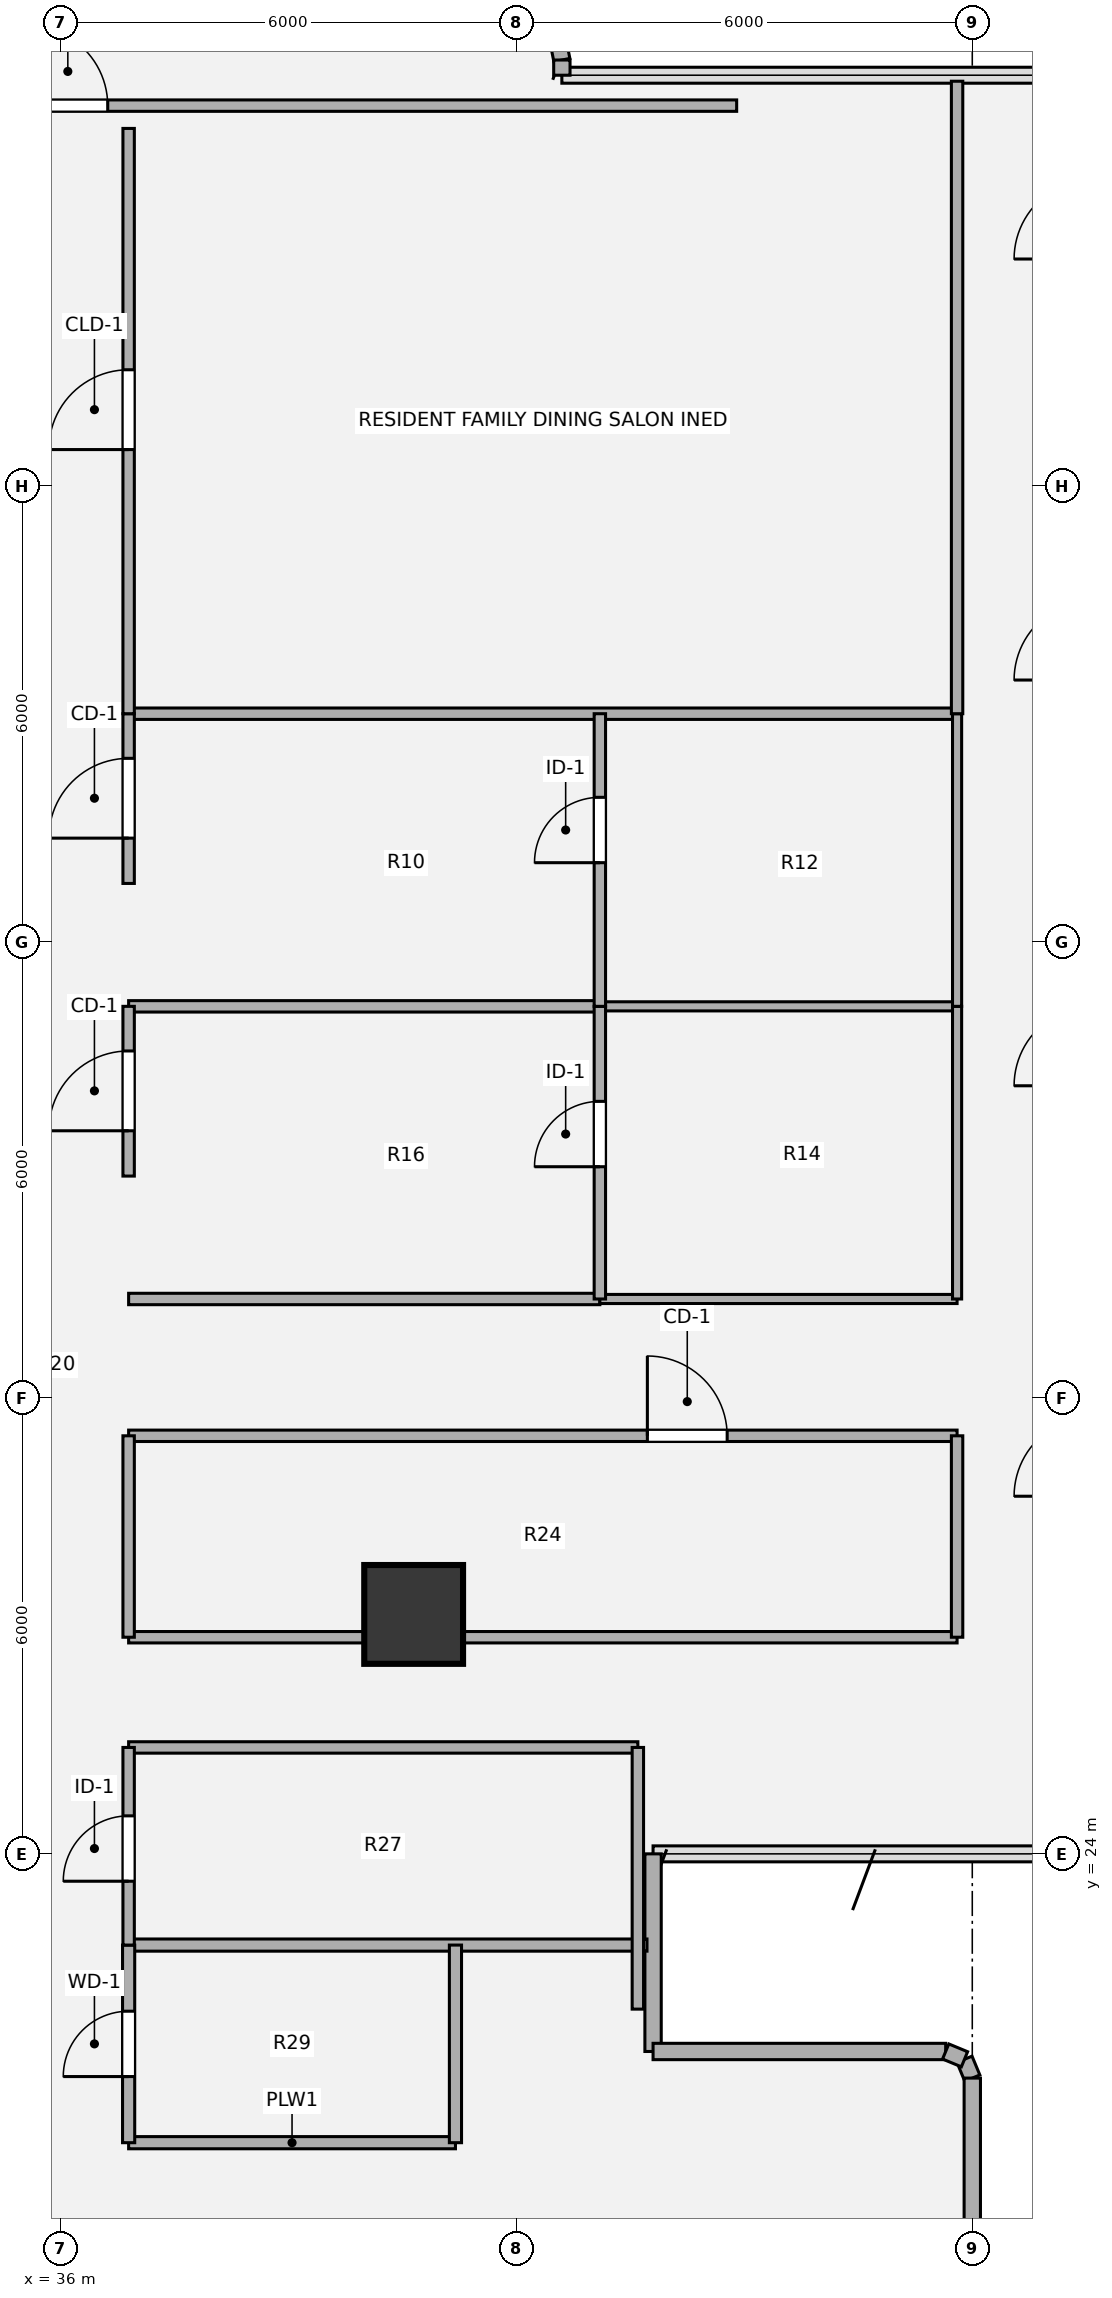
"""IFC4 building model, lengths in metres.
Left out: names, types, materials, properties, quantities, classifications, styles, units other than length and angle.
Written with IfcOpenShell. Run it as: python <this file> out.ifc"""

import sys

from ifc_helpers import new_model, si_unit, direction, frame, frame_2d, origin, origin_2d, place, context, subcontext, project, spatial, rectangle, hollow_circle, extrude, source, transform, mapped, element, fill, save


model = new_model("IFC4")
c1 = context("Model", 3, precision=1e-05, world=origin(), true_north=direction((0.0, 1.0)))
c2 = subcontext(c1, "Body", "Model", "MODEL_VIEW")
j1 = project(units=[si_unit("LENGTHUNIT", "METRE"), si_unit("PLANEANGLEUNIT", "RADIAN")], contexts=[c1])
p1 = place(None, origin())
s1 = spatial("IfcSite", under=j1, at=p1, CompositionType="ELEMENT")
p2 = place(p1, origin())
s2 = spatial("IfcBuilding", under=s1, at=p2, CompositionType="ELEMENT")
p3 = place(p2, frame((0.0, 0.0, 135.18)))
s3 = spatial("IfcBuildingStorey", under=s2, at=p3, CompositionType="ELEMENT", Elevation=135.18)
m1 = source(origin(), c2, "Body", "SweptSolid", [
    extrude(hollow_circle(Radius=0.65, WallThickness=0.045, at=origin_2d()), origin(), (0.0, 0.0, 1.0), 3.78),
])
p4 = place(p3, frame((40.65, 27.15, 0.0), z_axis=(0.0, 0.0, 1.0), x_axis=(1.0, 0.0, 0.0)))
e1 = element("IfcColumn", 1, at=p4, inside=s3, PredefinedType="COLUMN", context=c2, shape_type="MappedRepresentation", body=[
    mapped(m1, transform((0.0, 0.0, 0.0), x_axis=(1.0, 0.0, 0.0), y_axis=(0.0, 1.0, 0.0), z_axis=(0.0, 0.0, 1.0), scale=1.0)),
])
p5 = place(p3, frame((47.897, 21.298, 0.0), z_axis=(0.0, 0.0, 1.0), x_axis=(0.382673670509, -0.923883575944, 0.0)))
e2 = element("IfcWall", 2, at=p5, inside=s3, PredefinedType="SOLIDWALL", context=c2, shape_type="SweptSolid", body=[
    extrude(rectangle(XDim=0.268, YDim=0.215, at=frame_2d((0.134, 0.0))), origin(), (0.0, 0.0, 1.0), 3.53),
])
p6 = place(p3, frame((48.0, 21.05, 0.0), z_axis=(0.0, 0.0, 1.0), x_axis=(0.0, -1.0, 0.0)))
e3 = element("IfcWall", 3, at=p6, inside=s3, PredefinedType="SOLIDWALL", context=c2, shape_type="SweptSolid", body=[
    extrude(rectangle(XDim=2.62, YDim=0.215, at=frame_2d((1.31, 0.0))), origin(), (0.0, 0.0, 1.0), 3.53),
])
p7 = place(p3, frame((42.387, 48.671, 0.0), z_axis=(0.0, 0.0, 1.0), x_axis=(0.195127417394, -0.980777900945, 0.0)))
e4 = element("IfcWall", 4, at=p7, inside=s3, PredefinedType="SOLIDWALL", context=c2, shape_type="SweptSolid", body=[
    extrude(rectangle(XDim=1.092, YDim=0.215, at=frame_2d((0.546, 0.0))), origin(), (0.0, 0.0, 1.0), 3.53),
])
p8 = place(p3, frame((42.6, 47.6, 0.0), z_axis=(0.0, 0.0, 1.0), x_axis=(0.0, -1.0, 0.0)))
e5 = element("IfcWall", 5, at=p8, inside=s3, PredefinedType="SOLIDWALL", context=c2, shape_type="SweptSolid", body=[
    extrude(rectangle(XDim=0.2, YDim=0.215, at=frame_2d((0.1, 0.0))), origin(), (0.0, 0.0, 1.0), 3.53),
])
p9 = place(p3, frame((43.8, 24.0, 0.0), z_axis=(0.0, 0.0, 1.0), x_axis=(0.0, -1.0, 0.0)))
e6 = element("IfcWall", 6, at=p9, inside=s3, PredefinedType="SOLIDWALL", context=c2, shape_type="SweptSolid", body=[
    extrude(rectangle(XDim=2.6, YDim=0.215, at=frame_2d((1.3, 0.0))), origin(), (0.0, 0.0, 1.0), 3.53),
])
p10 = place(p3, frame((43.8, 21.4, 0.0), z_axis=(0.0, 0.0, 1.0), x_axis=(1.0, 0.0, 0.0)))
e7 = element("IfcWall", 7, at=p10, inside=s3, PredefinedType="SOLIDWALL", context=c2, shape_type="SweptSolid", body=[
    extrude(rectangle(XDim=3.85, YDim=0.215, at=frame_2d((1.925, 0.0))), origin(), (0.0, 0.0, 1.0), 3.53),
])
p11 = place(p3, frame((47.65, 21.4, 0.0), z_axis=(0.0, 0.0, 1.0), x_axis=(0.924205486139, -0.381895560841, 0.0)))
e8 = element("IfcWall", 8, at=p11, inside=s3, PredefinedType="SOLIDWALL", context=c2, shape_type="SweptSolid", body=[
    extrude(rectangle(XDim=0.268, YDim=0.215, at=frame_2d((0.134, 0.0))), origin(), (0.0, 0.0, 1.0), 3.53),
])
p12 = place(p3, frame((36.9, 20.2, 0.0), z_axis=(0.0, 0.0, 1.0), x_axis=(1.0, 0.0, 0.0)))
e9 = element("IfcWall", 9, at=p12, inside=s3, PredefinedType="PLUMBINGWALL", context=c2, shape_type="SweptSolid", body=[
    extrude(rectangle(XDim=4.3, YDim=0.16, at=frame_2d((2.15, 0.0))), origin(), (0.0, 0.0, 1.0), 3.5),
])
p13 = place(p3, frame((36.9, 22.8, 0.0), z_axis=(0.0, 0.0, 1.0), x_axis=(1.0, 0.0, 0.0)))
e10 = element("IfcWall", 10, at=p13, inside=s3, PredefinedType="PLUMBINGWALL", context=c2, shape_type="SweptSolid", body=[
    extrude(rectangle(XDim=6.82, YDim=0.16, at=frame_2d((3.41, 0.0))), origin(), (0.0, 0.0, 1.0), 3.5),
])
p14 = place(p3, frame((36.9, 25.4, 0.0), z_axis=(0.0, 0.0, 1.0), x_axis=(1.0, 0.0, 0.0)))
e11 = element("IfcWall", 11, at=p14, inside=s3, PredefinedType="PARTITIONING", context=c2, shape_type="SweptSolid", body=[
    extrude(rectangle(XDim=6.7, YDim=0.15, at=frame_2d((3.35, 0.0))), origin(), (0.0, 0.0, 1.0), 3.5),
])
p15 = place(p3, frame((36.9, 26.85, 0.0), z_axis=(0.0, 0.0, 1.0), x_axis=(1.0, 0.0, 0.0)))
e12 = element("IfcWall", 12, at=p15, inside=s3, PredefinedType="PARTITIONING", context=c2, shape_type="SweptSolid", body=[
    extrude(rectangle(XDim=10.9, YDim=0.15, at=frame_2d((5.45, 0.0))), origin(), (0.0, 0.0, 1.0), 2.903),
])
p16 = place(p3, frame((36.9, 29.5, 0.0), z_axis=(0.0, 0.0, 1.0), x_axis=(1.0, 0.0, 0.0)))
e13 = element("IfcWall", 13, at=p16, inside=s3, PredefinedType="PARTITIONING", context=c2, shape_type="SweptSolid", body=[
    extrude(rectangle(XDim=10.9, YDim=0.15, at=frame_2d((5.45, 0.0))), origin(), (0.0, 0.0, 1.0), 2.982),
])
p17 = place(p16, frame((6.825, 0.0, 0.0)))
e14 = element("IfcOpeningElement", 14, at=p17, cuts=e13, PredefinedType="OPENING", context=c2, shape_type="SweptSolid", body=[
    extrude(rectangle(XDim=1.05, YDim=2.1, at=origin_2d()), frame((0.525, 0.085, 1.05), z_axis=(0.0, -1.0, 0.0), x_axis=(1.0, 0.0, 0.0)), (0.0, 0.0, 1.0), 0.17),
])
p18 = place(p3, frame((36.9, 31.3, 0.0), z_axis=(0.0, 0.0, 1.0), x_axis=(1.0, 0.0, 0.0)))
e15 = element("IfcWall", 15, at=p18, inside=s3, PredefinedType="PARTITIONING", context=c2, shape_type="SweptSolid", body=[
    extrude(rectangle(XDim=6.2, YDim=0.15, at=frame_2d((3.1, 0.0))), origin(), (0.0, 0.0, 1.0), 2.982),
])
p19 = place(p3, frame((43.1, 31.3, 0.0), z_axis=(0.0, 0.0, 1.0), x_axis=(1.0, 0.0, 0.0)))
e16 = element("IfcWall", 16, at=p19, inside=s3, PredefinedType="PARTITIONING", context=c2, shape_type="SweptSolid", body=[
    extrude(rectangle(XDim=4.7, YDim=0.12, at=frame_2d((2.35, 0.0))), origin(), (0.0, 0.0, 1.0), 2.982),
])
p20 = place(p3, frame((36.9, 35.15, 0.0), z_axis=(0.0, 0.0, 1.0), x_axis=(1.0, 0.0, 0.0)))
e17 = element("IfcWall", 17, at=p20, inside=s3, PredefinedType="PARTITIONING", context=c2, shape_type="SweptSolid", body=[
    extrude(rectangle(XDim=6.2, YDim=0.15, at=frame_2d((3.1, 0.0))), origin(), (0.0, 0.0, 1.0), 2.982),
])
p21 = place(p3, frame((43.1, 35.15, 0.0), z_axis=(0.0, 0.0, 1.0), x_axis=(1.0, 0.0, 0.0)))
e18 = element("IfcWall", 18, at=p21, inside=s3, PredefinedType="PARTITIONING", context=c2, shape_type="SweptSolid", body=[
    extrude(rectangle(XDim=4.7, YDim=0.12, at=frame_2d((2.35, 0.0))), origin(), (0.0, 0.0, 1.0), 2.982),
])
p22 = place(p3, frame((36.9, 39.0, 0.0), z_axis=(0.0, 0.0, 1.0), x_axis=(1.0, 0.0, 0.0)))
e19 = element("IfcWall", 19, at=p22, inside=s3, PredefinedType="PARTITIONING", context=c2, shape_type="SweptSolid", body=[
    extrude(rectangle(XDim=10.9, YDim=0.15, at=frame_2d((5.45, 0.0))), origin(), (0.0, 0.0, 1.0), 2.903),
])
p23 = place(p3, frame((35.1, 47.0, 0.0), z_axis=(0.0, 0.0, 1.0), x_axis=(1.0, 0.0, 0.0)))
e20 = element("IfcWall", 20, at=p23, inside=s3, PredefinedType="PARTITIONING", context=c2, shape_type="SweptSolid", body=[
    extrude(rectangle(XDim=9.8, YDim=0.15, at=frame_2d((4.9, 0.0))), origin(), (0.0, 0.0, 1.0), 3.308),
])
p24 = place(p23, frame((0.475, 0.0, 0.0)))
e21 = element("IfcOpeningElement", 21, at=p24, cuts=e20, PredefinedType="OPENING", context=c2, shape_type="SweptSolid", body=[
    extrude(rectangle(XDim=1.05, YDim=2.1, at=origin_2d()), frame((0.525, 0.085, 1.05), z_axis=(0.0, -1.0, 0.0), x_axis=(1.0, 0.0, 0.0)), (0.0, 0.0, 1.0), 0.17),
])
p25 = place(p3, frame((36.9, 20.2, 0.0), z_axis=(0.0, 0.0, 1.0), x_axis=(0.0, 1.0, 0.0)))
e22 = element("IfcWall", 22, at=p25, inside=s3, PredefinedType="PLUMBINGWALL", context=c2, shape_type="SweptSolid", body=[
    extrude(rectangle(XDim=2.6, YDim=0.16, at=frame_2d((1.3, 0.0))), origin(), (0.0, 0.0, 1.0), 3.5),
])
p26 = place(p25, frame((0.87, 0.0, 0.0)))
e23 = element("IfcOpeningElement", 23, at=p26, cuts=e22, PredefinedType="OPENING", context=c2, shape_type="SweptSolid", body=[
    extrude(rectangle(XDim=0.86, YDim=2.1, at=origin_2d()), frame((0.43, 0.09, 1.05), z_axis=(0.0, -1.0, 0.0), x_axis=(1.0, 0.0, 0.0)), (0.0, 0.0, 1.0), 0.18),
])
p27 = place(p3, frame((36.9, 22.8, 0.0), z_axis=(0.0, 0.0, 1.0), x_axis=(0.0, 1.0, 0.0)))
e24 = element("IfcWall", 24, at=p27, inside=s3, PredefinedType="PARTITIONING", context=c2, shape_type="SweptSolid", body=[
    extrude(rectangle(XDim=2.6, YDim=0.15, at=frame_2d((1.3, 0.0))), origin(), (0.0, 0.0, 1.0), 3.5),
])
p28 = place(p27, frame((0.84, 0.0, 0.0)))
e25 = element("IfcOpeningElement", 25, at=p28, cuts=e24, PredefinedType="OPENING", context=c2, shape_type="SweptSolid", body=[
    extrude(rectangle(XDim=0.86, YDim=2.1, at=origin_2d()), frame((0.43, 0.085, 1.05), z_axis=(0.0, -1.0, 0.0), x_axis=(1.0, 0.0, 0.0)), (0.0, 0.0, 1.0), 0.17),
])
p29 = place(p3, frame((36.9, 26.85, 0.0), z_axis=(0.0, 0.0, 1.0), x_axis=(0.0, 1.0, 0.0)))
e26 = element("IfcWall", 26, at=p29, inside=s3, PredefinedType="PARTITIONING", context=c2, shape_type="SweptSolid", body=[
    extrude(rectangle(XDim=2.65, YDim=0.15, at=frame_2d((1.325, 0.0))), origin(), (0.0, 0.0, 1.0), 3.5),
])
p30 = place(p3, frame((36.9, 32.917, 0.0), z_axis=(0.0, 0.0, 1.0), x_axis=(0.0, 1.0, 0.0)))
e27 = element("IfcWall", 27, at=p30, inside=s3, PredefinedType="PARTITIONING", context=c2, shape_type="SweptSolid", body=[
    extrude(rectangle(XDim=2.233, YDim=0.15, at=frame_2d((1.116, 0.0))), origin(), (0.0, 0.0, 1.0), 3.5),
])
p31 = place(p30, frame((0.596, 0.0, 0.0)))
e28 = element("IfcOpeningElement", 28, at=p31, cuts=e27, PredefinedType="OPENING", context=c2, shape_type="SweptSolid", body=[
    extrude(rectangle(XDim=1.05, YDim=2.1, at=origin_2d()), frame((0.525, 0.085, 1.05), z_axis=(0.0, -1.0, 0.0), x_axis=(1.0, 0.0, 0.0)), (0.0, 0.0, 1.0), 0.17),
])
p32 = place(p3, frame((36.9, 36.767, 0.0), z_axis=(0.0, 0.0, 1.0), x_axis=(0.0, 1.0, 0.0)))
e29 = element("IfcWall", 29, at=p32, inside=s3, PredefinedType="PARTITIONING", context=c2, shape_type="SweptSolid", body=[
    extrude(rectangle(XDim=2.233, YDim=0.15, at=frame_2d((1.116, 0.0))), origin(), (0.0, 0.0, 1.0), 3.5),
])
p33 = place(p32, frame((0.596, 0.0, 0.0)))
e30 = element("IfcOpeningElement", 30, at=p33, cuts=e29, PredefinedType="OPENING", context=c2, shape_type="SweptSolid", body=[
    extrude(rectangle(XDim=1.05, YDim=2.1, at=origin_2d()), frame((0.525, 0.085, 1.05), z_axis=(0.0, -1.0, 0.0), x_axis=(1.0, 0.0, 0.0)), (0.0, 0.0, 1.0), 0.17),
])
p34 = place(p3, frame((36.9, 39.0, 0.0), z_axis=(0.0, 0.0, 1.0), x_axis=(0.0, 1.0, 0.0)))
e31 = element("IfcWall", 31, at=p34, inside=s3, PredefinedType="PARTITIONING", context=c2, shape_type="SweptSolid", body=[
    extrude(rectangle(XDim=7.7, YDim=0.15, at=frame_2d((3.85, 0.0))), origin(), (0.0, 0.0, 1.0), 3.5),
])
p35 = place(p34, frame((3.475, 0.0, 0.0)))
e32 = element("IfcOpeningElement", 32, at=p35, cuts=e31, PredefinedType="OPENING", context=c2, shape_type="SweptSolid", body=[
    extrude(rectangle(XDim=1.05, YDim=2.1, at=origin_2d()), frame((0.525, 0.085, 1.05), z_axis=(0.0, -1.0, 0.0), x_axis=(1.0, 0.0, 0.0)), (0.0, 0.0, 1.0), 0.17),
])
p36 = place(p3, frame((41.2, 20.2, 0.0), z_axis=(0.0, 0.0, 1.0), x_axis=(0.0, 1.0, 0.0)))
e33 = element("IfcWall", 33, at=p36, inside=s3, PredefinedType="PLUMBINGWALL", context=c2, shape_type="SweptSolid", body=[
    extrude(rectangle(XDim=2.6, YDim=0.16, at=frame_2d((1.3, 0.0))), origin(), (0.0, 0.0, 1.0), 2.815),
])
p37 = place(p3, frame((43.1, 31.3, 0.0), z_axis=(0.0, 0.0, 1.0), x_axis=(0.0, 1.0, 0.0)))
e34 = element("IfcWall", 34, at=p37, inside=s3, PredefinedType="PARTITIONING", context=c2, shape_type="SweptSolid", body=[
    extrude(rectangle(XDim=3.85, YDim=0.15, at=frame_2d((1.925, 0.0))), origin(), (0.0, 0.0, 1.0), 3.5),
])
p38 = place(p37, frame((1.74, 0.0, 0.0)))
e35 = element("IfcOpeningElement", 35, at=p38, cuts=e34, PredefinedType="OPENING", context=c2, shape_type="SweptSolid", body=[
    extrude(rectangle(XDim=0.86, YDim=2.1, at=origin_2d()), frame((0.43, 0.085, 1.05), z_axis=(0.0, -1.0, 0.0), x_axis=(1.0, 0.0, 0.0)), (0.0, 0.0, 1.0), 0.17),
])
p39 = place(p3, frame((43.1, 35.15, 0.0), z_axis=(0.0, 0.0, 1.0), x_axis=(0.0, 1.0, 0.0)))
e36 = element("IfcWall", 36, at=p39, inside=s3, PredefinedType="PARTITIONING", context=c2, shape_type="SweptSolid", body=[
    extrude(rectangle(XDim=3.85, YDim=0.15, at=frame_2d((1.925, 0.0))), origin(), (0.0, 0.0, 1.0), 3.5),
])
p40 = place(p39, frame((1.89, 0.0, 0.0)))
e37 = element("IfcOpeningElement", 37, at=p40, cuts=e36, PredefinedType="OPENING", context=c2, shape_type="SweptSolid", body=[
    extrude(rectangle(XDim=0.86, YDim=2.1, at=origin_2d()), frame((0.43, 0.085, 1.05), z_axis=(0.0, -1.0, 0.0), x_axis=(1.0, 0.0, 0.0)), (0.0, 0.0, 1.0), 0.17),
])
p41 = place(p3, frame((43.6, 21.958, 0.0), z_axis=(0.0, 0.0, 1.0), x_axis=(0.0, 1.0, 0.0)))
e38 = element("IfcWall", 38, at=p41, inside=s3, PredefinedType="PARTITIONING", context=c2, shape_type="SweptSolid", body=[
    extrude(rectangle(XDim=3.442, YDim=0.15, at=frame_2d((1.721, 0.0))), origin(), (0.0, 0.0, 1.0), 3.5),
])
p42 = place(p3, frame((47.8, 26.85, 0.0), z_axis=(0.0, 0.0, 1.0), x_axis=(0.0, 1.0, 0.0)))
e39 = element("IfcWall", 39, at=p42, inside=s3, PredefinedType="PARTITIONING", context=c2, shape_type="SweptSolid", body=[
    extrude(rectangle(XDim=2.65, YDim=0.15, at=frame_2d((1.325, 0.0))), origin(), (0.0, 0.0, 1.0), 3.5),
])
p43 = place(p3, frame((47.8, 31.3, 0.0), z_axis=(0.0, 0.0, 1.0), x_axis=(0.0, 1.0, 0.0)))
e40 = element("IfcWall", 40, at=p43, inside=s3, PredefinedType="PARTITIONING", context=c2, shape_type="SweptSolid", body=[
    extrude(rectangle(XDim=3.85, YDim=0.12, at=frame_2d((1.925, 0.0))), origin(), (0.0, 0.0, 1.0), 3.5),
])
p44 = place(p3, frame((47.8, 35.15, 0.0), z_axis=(0.0, 0.0, 1.0), x_axis=(0.0, 1.0, 0.0)))
e41 = element("IfcWall", 41, at=p44, inside=s3, PredefinedType="PARTITIONING", context=c2, shape_type="SweptSolid", body=[
    extrude(rectangle(XDim=3.85, YDim=0.12, at=frame_2d((1.925, 0.0))), origin(), (0.0, 0.0, 1.0), 3.5),
])
p45 = place(p3, frame((47.8, 39.0, 0.0), z_axis=(0.0, 0.0, 1.0), x_axis=(0.0, 1.0, 0.0)))
e42 = element("IfcWall", 42, at=p45, inside=s3, PredefinedType="PARTITIONING", context=c2, shape_type="SweptSolid", body=[
    extrude(rectangle(XDim=8.321, YDim=0.15, at=frame_2d((4.16, 0.0))), origin(), (0.0, 0.0, 1.0), 3.5),
])
m2 = source(origin(), c2, "Body", "SweptSolid", [
    extrude(rectangle(XDim=1.05, YDim=2.1, at=origin_2d()), frame((0.525, 0.025, 1.05), z_axis=(0.0, -1.0, 0.0), x_axis=(1.0, 0.0, 0.0)), (0.0, 0.0, 1.0), 0.05),
])
p46 = place(p17, origin())
e43 = element("IfcDoor", 43, at=p46, inside=s3, OperationType="SINGLE_SWING_LEFT", PredefinedType="DOOR", context=c2, shape_type="MappedRepresentation", body=[
    mapped(m2, transform((0.0, 0.0, 0.0), x_axis=(1.0, 0.0, 0.0), y_axis=(0.0, 1.0, 0.0), z_axis=(0.0, 0.0, 1.0), scale=1.0)),
])
fill(e14, e43)
m3 = source(origin(), c2, "Body", "SweptSolid", [
    extrude(rectangle(XDim=1.05, YDim=2.1, at=origin_2d()), frame((0.525, 0.025, 1.05), z_axis=(0.0, -1.0, 0.0), x_axis=(1.0, 0.0, 0.0)), (0.0, 0.0, 1.0), 0.05),
])
p47 = place(p24, origin())
e44 = element("IfcDoor", 44, at=p47, inside=s3, OperationType="SINGLE_SWING_LEFT", PredefinedType="DOOR", context=c2, shape_type="MappedRepresentation", body=[
    mapped(m3, transform((0.0, 0.0, 0.0), x_axis=(1.0, 0.0, 0.0), y_axis=(0.0, 1.0, 0.0), z_axis=(0.0, 0.0, 1.0), scale=1.0)),
])
fill(e21, e44)
m4 = source(origin(), c2, "Body", "SweptSolid", [
    extrude(rectangle(XDim=0.86, YDim=2.1, at=origin_2d()), frame((0.43, 0.025, 1.05), z_axis=(0.0, -1.0, 0.0), x_axis=(1.0, 0.0, 0.0)), (0.0, 0.0, 1.0), 0.05),
])
p48 = place(p26, origin())
e45 = element("IfcDoor", 45, at=p48, inside=s3, OperationType="SINGLE_SWING_LEFT", PredefinedType="DOOR", context=c2, shape_type="MappedRepresentation", body=[
    mapped(m4, transform((0.0, 0.0, 0.0), x_axis=(1.0, 0.0, 0.0), y_axis=(0.0, 1.0, 0.0), z_axis=(0.0, 0.0, 1.0), scale=1.0)),
])
fill(e23, e45)
m5 = source(origin(), c2, "Body", "SweptSolid", [
    extrude(rectangle(XDim=0.86, YDim=2.1, at=origin_2d()), frame((0.43, 0.025, 1.05), z_axis=(0.0, -1.0, 0.0), x_axis=(1.0, 0.0, 0.0)), (0.0, 0.0, 1.0), 0.05),
])
p49 = place(p28, origin())
e46 = element("IfcDoor", 46, at=p49, inside=s3, OperationType="SINGLE_SWING_LEFT", PredefinedType="DOOR", context=c2, shape_type="MappedRepresentation", body=[
    mapped(m5, transform((0.0, 0.0, 0.0), x_axis=(1.0, 0.0, 0.0), y_axis=(0.0, 1.0, 0.0), z_axis=(0.0, 0.0, 1.0), scale=1.0)),
])
fill(e25, e46)
p50 = place(p31, origin())
e47 = element("IfcDoor", 47, at=p50, inside=s3, OperationType="SINGLE_SWING_LEFT", PredefinedType="DOOR", context=c2, shape_type="MappedRepresentation", body=[
    mapped(m2, transform((0.0, 0.0, 0.0), x_axis=(1.0, 0.0, 0.0), y_axis=(0.0, 1.0, 0.0), z_axis=(0.0, 0.0, 1.0), scale=1.0)),
])
fill(e28, e47)
p51 = place(p33, origin())
e48 = element("IfcDoor", 48, at=p51, inside=s3, OperationType="SINGLE_SWING_LEFT", PredefinedType="DOOR", context=c2, shape_type="MappedRepresentation", body=[
    mapped(m2, transform((0.0, 0.0, 0.0), x_axis=(1.0, 0.0, 0.0), y_axis=(0.0, 1.0, 0.0), z_axis=(0.0, 0.0, 1.0), scale=1.0)),
])
fill(e30, e48)
p52 = place(p35, origin())
e49 = element("IfcDoor", 49, at=p52, inside=s3, OperationType="SINGLE_SWING_LEFT", PredefinedType="DOOR", context=c2, shape_type="MappedRepresentation", body=[
    mapped(m3, transform((0.0, 0.0, 0.0), x_axis=(1.0, 0.0, 0.0), y_axis=(0.0, 1.0, 0.0), z_axis=(0.0, 0.0, 1.0), scale=1.0)),
])
fill(e32, e49)
p53 = place(p38, origin())
e50 = element("IfcDoor", 50, at=p53, inside=s3, OperationType="SINGLE_SWING_LEFT", PredefinedType="DOOR", context=c2, shape_type="MappedRepresentation", body=[
    mapped(m5, transform((0.0, 0.0, 0.0), x_axis=(1.0, 0.0, 0.0), y_axis=(0.0, 1.0, 0.0), z_axis=(0.0, 0.0, 1.0), scale=1.0)),
])
fill(e35, e50)
p54 = place(p40, origin())
e51 = element("IfcDoor", 51, at=p54, inside=s3, OperationType="SINGLE_SWING_LEFT", PredefinedType="DOOR", context=c2, shape_type="MappedRepresentation", body=[
    mapped(m5, transform((0.0, 0.0, 0.0), x_axis=(1.0, 0.0, 0.0), y_axis=(0.0, 1.0, 0.0), z_axis=(0.0, 0.0, 1.0), scale=1.0)),
])
fill(e37, e51)
save(model, sys.argv[1])
